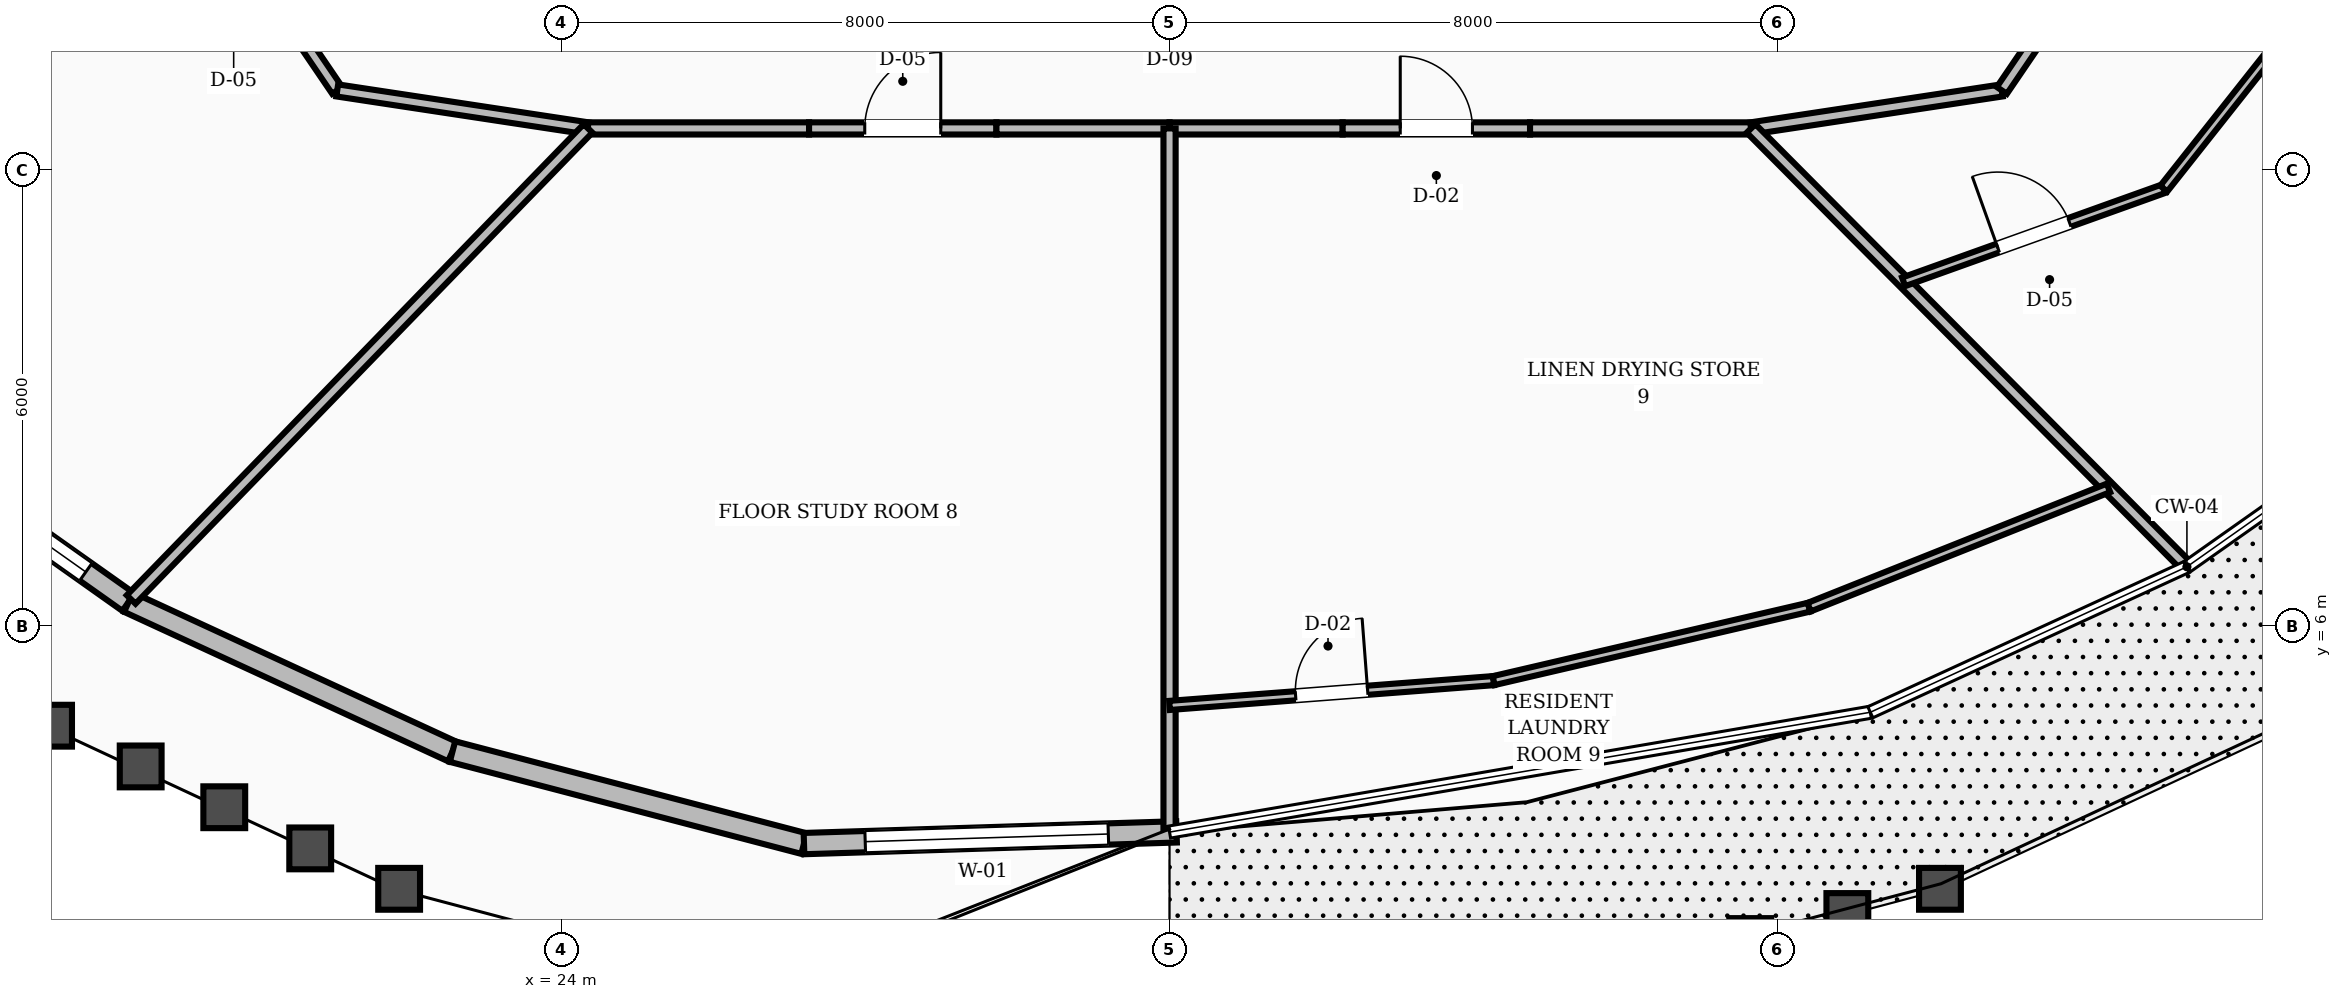
"""IFC4 building model, lengths in metres.
Left out: names, types, materials, properties, quantities, classifications, styles, units other than length and angle.
Written with IfcOpenShell. Run it as: python <this file> out.ifc"""

import sys

from ifc_helpers import new_model, si_unit, direction, frame, frame_2d, origin, place, context, subcontext, project, spatial, rectangle, extrude, element, fill, save


model = new_model("IFC4")
c1 = context("Model", 3, precision=1e-05, world=origin(), true_north=direction((0.0, 1.0)))
c2 = subcontext(c1, "Body", "Model", "MODEL_VIEW")
j1 = project(units=[si_unit("LENGTHUNIT", "METRE"), si_unit("PLANEANGLEUNIT", "RADIAN")], contexts=[c1])
p1 = place(None, origin())
s1 = spatial("IfcSite", under=j1, at=p1, CompositionType="ELEMENT")
p2 = place(p1, origin())
s2 = spatial("IfcBuilding", under=s1, at=p2, CompositionType="ELEMENT")
p3 = place(p2, frame((0.0, 0.0, 196.4)))
s3 = spatial("IfcBuildingStorey", under=s2, at=p3, CompositionType="ELEMENT", Elevation=196.4)
p4 = place(p3, frame((14.569, 8.962, 0.0), z_axis=(0.0, 0.0, 1.0), x_axis=(0.81615549773, -0.577832331672, 0.0)))
e1 = element("IfcWall", 1, at=p4, inside=s3, PredefinedType="STANDARD", context=c2, shape_type="SweptSolid", body=[
    extrude(rectangle(XDim=4.577, YDim=0.28, at=frame_2d((2.289, 0.0))), origin(), (0.0, 0.0, 1.0), 2.82),
])
p5 = place(p4, frame((0.688, 0.0, 0.8)))
e2 = element("IfcOpeningElement", 2, at=p5, cuts=e1, PredefinedType="OPENING", context=c2, shape_type="SweptSolid", body=[
    extrude(rectangle(XDim=3.2, YDim=1.65, at=frame_2d((1.6, 0.825))), frame((0.0, 0.15, 0.0), z_axis=(0.0, -1.0, 0.0), x_axis=(1.0, 0.0, 0.0)), (0.0, 0.0, 1.0), 0.3),
])
p6 = place(p3, frame((18.304, 6.317, 0.0), z_axis=(0.0, 0.0, 1.0), x_axis=(0.908099405027, -0.41875466635, 0.0)))
e3 = element("IfcWall", 3, at=p6, inside=s3, PredefinedType="STANDARD", context=c2, shape_type="SweptSolid", body=[
    extrude(rectangle(XDim=4.693, YDim=0.28, at=frame_2d((2.347, 0.0))), origin(), (0.0, 0.0, 1.0), 2.82),
])
p7 = place(p3, frame((22.566, 4.352, 0.0), z_axis=(0.0, 0.0, 1.0), x_axis=(0.967422274867, -0.253168209086, 0.0)))
e4 = element("IfcWall", 4, at=p7, inside=s3, PredefinedType="STANDARD", context=c2, shape_type="SweptSolid", body=[
    extrude(rectangle(XDim=4.78, YDim=0.28, at=frame_2d((2.39, 0.0))), origin(), (0.0, 0.0, 1.0), 2.82),
])
p8 = place(p3, frame((27.191, 3.141, 0.0), z_axis=(0.0, 0.0, 1.0), x_axis=(0.999504860995, 0.031464787415, 0.0)))
e5 = element("IfcWall", 5, at=p8, inside=s3, PredefinedType="STANDARD", context=c2, shape_type="SweptSolid", body=[
    extrude(rectangle(XDim=4.904, YDim=0.28, at=frame_2d((2.452, 0.0))), origin(), (0.0, 0.0, 1.0), 2.82),
])
p9 = place(p8, frame((0.806, 0.0, 0.8)))
e6 = element("IfcOpeningElement", 6, at=p9, cuts=e5, PredefinedType="OPENING", context=c2, shape_type="SweptSolid", body=[
    extrude(rectangle(XDim=3.2, YDim=1.65, at=frame_2d((1.6, 0.825))), frame((0.0, 0.15, 0.0), z_axis=(0.0, -1.0, 0.0), x_axis=(1.0, 0.0, 0.0)), (0.0, 0.0, 1.0), 0.3),
])
p10 = place(p3, frame((19.35, 15.548, 0.0), z_axis=(0.0, 0.0, 1.0), x_axis=(0.562674669208, -0.826678423955, 0.0)))
e7 = element("IfcWall", 7, at=p10, inside=s3, PredefinedType="SOLIDWALL", context=c2, shape_type="SweptSolid", body=[
    extrude(rectangle(XDim=3.021, YDim=0.16, at=frame_2d((1.511, 0.0))), origin(), (0.0, 0.0, 1.0), 2.8),
])
p11 = place(p10, frame((1.01, 0.0, 0.0)))
e8 = element("IfcOpeningElement", 8, at=p11, cuts=e7, PredefinedType="OPENING", context=c2, shape_type="SweptSolid", body=[
    extrude(rectangle(XDim=1.0, YDim=2.1, at=frame_2d((0.5, 1.05))), frame((0.0, 0.09, 0.0), z_axis=(0.0, -1.0, 0.0), x_axis=(1.0, 0.0, 0.0)), (0.0, 0.0, 1.0), 0.18),
])
p12 = place(p3, frame((21.05, 13.05, 0.0), z_axis=(0.0, 0.0, 1.0), x_axis=(0.988710906508, -0.149835721217, 0.0)))
e9 = element("IfcWall", 9, at=p12, inside=s3, PredefinedType="SOLIDWALL", context=c2, shape_type="SweptSolid", body=[
    extrude(rectangle(XDim=3.337, YDim=0.16, at=frame_2d((1.668, 0.0))), origin(), (0.0, 0.0, 1.0), 2.8),
])
p13 = place(p3, frame((24.349, 12.55, 0.0), z_axis=(0.0, 0.0, 1.0), x_axis=(1.0, 0.0, 0.0)))
e10 = element("IfcWall", 10, at=p13, inside=s3, PredefinedType="SOLIDWALL", context=c2, shape_type="SweptSolid", body=[
    extrude(rectangle(XDim=2.908, YDim=0.16, at=frame_2d((1.454, 0.0))), origin(), (0.0, 0.0, 1.0), 2.8),
])
p14 = place(p3, frame((27.257, 12.55, 0.0), z_axis=(0.0, 0.0, 1.0), x_axis=(1.0, 0.0, 0.0)))
e11 = element("IfcWall", 11, at=p14, inside=s3, PredefinedType="SOLIDWALL", context=c2, shape_type="SweptSolid", body=[
    extrude(rectangle(XDim=2.465, YDim=0.16, at=frame_2d((1.232, 0.0))), origin(), (0.0, 0.0, 1.0), 2.8),
])
p15 = place(p14, frame((0.733, 0.0, 0.0)))
e12 = element("IfcOpeningElement", 12, at=p15, cuts=e11, PredefinedType="OPENING", context=c2, shape_type="SweptSolid", body=[
    extrude(rectangle(XDim=1.0, YDim=2.1, at=frame_2d((0.5, 1.05))), frame((0.0, 0.09, 0.0), z_axis=(0.0, -1.0, 0.0), x_axis=(1.0, 0.0, 0.0)), (0.0, 0.0, 1.0), 0.18),
])
for number, where, z_axis, x_axis in (
    (13, (29.722, 12.55, 0.0), (0.0, 0.0, 1.0), (1.0, 0.0, 0.0)),
    (14, (32.0, 12.55, 0.0), (0.0, 0.0, 1.0), (1.0, 0.0, 0.0)),
):
    element("IfcWall", number, at=place(p3, frame(where, z_axis=z_axis, x_axis=x_axis)), inside=s3, PredefinedType="SOLIDWALL", context=c2, shape_type="SweptSolid", body=[
        extrude(rectangle(XDim=2.278, YDim=0.16, at=frame_2d((1.139, 0.0))), origin(), (0.0, 0.0, 1.0), 2.8),
    ])
p16 = place(p3, frame((34.278, 12.55, 0.0), z_axis=(0.0, 0.0, 1.0), x_axis=(1.0, 0.0, 0.0)))
e15 = element("IfcWall", 15, at=p16, inside=s3, PredefinedType="SOLIDWALL", context=c2, shape_type="SweptSolid", body=[
    extrude(rectangle(XDim=2.465, YDim=0.16, at=frame_2d((1.232, 0.0))), origin(), (0.0, 0.0, 1.0), 2.8),
])
p17 = place(p16, frame((0.758, 0.0, 0.0)))
e16 = element("IfcOpeningElement", 16, at=p17, cuts=e15, PredefinedType="OPENING", context=c2, shape_type="SweptSolid", body=[
    extrude(rectangle(XDim=0.95, YDim=2.1, at=frame_2d((0.475, 1.05))), frame((0.0, 0.09, 0.0), z_axis=(0.0, -1.0, 0.0), x_axis=(1.0, 0.0, 0.0)), (0.0, 0.0, 1.0), 0.18),
])
p18 = place(p3, frame((36.743, 12.55, 0.0), z_axis=(0.0, 0.0, 1.0), x_axis=(1.0, 0.0, 0.0)))
e17 = element("IfcWall", 17, at=p18, inside=s3, PredefinedType="SOLIDWALL", context=c2, shape_type="SweptSolid", body=[
    extrude(rectangle(XDim=2.908, YDim=0.16, at=frame_2d((1.454, 0.0))), origin(), (0.0, 0.0, 1.0), 2.8),
])
p19 = place(p3, frame((39.651, 12.55, 0.0), z_axis=(0.0, 0.0, 1.0), x_axis=(0.988710906508, 0.149835721217, 0.0)))
e18 = element("IfcWall", 18, at=p19, inside=s3, PredefinedType="SOLIDWALL", context=c2, shape_type="SweptSolid", body=[
    extrude(rectangle(XDim=3.337, YDim=0.16, at=frame_2d((1.668, 0.0))), origin(), (0.0, 0.0, 1.0), 2.8),
])
p20 = place(p3, frame((42.95, 13.05, 0.0), z_axis=(0.0, 0.0, 1.0), x_axis=(0.562674669208, 0.826678423955, 0.0)))
e19 = element("IfcWall", 19, at=p20, inside=s3, PredefinedType="SOLIDWALL", context=c2, shape_type="SweptSolid", body=[
    extrude(rectangle(XDim=3.021, YDim=0.16, at=frame_2d((1.511, 0.0))), origin(), (0.0, 0.0, 1.0), 2.8),
])
p21 = place(p3, frame((39.651, 12.55, 0.0), z_axis=(0.0, 0.0, 1.0), x_axis=(0.705049844298, -0.709157751882, 0.0)))
e20 = element("IfcWall", 20, at=p21, inside=s3, PredefinedType="SOLIDWALL", context=c2, shape_type="SweptSolid", body=[
    extrude(rectangle(XDim=8.083, YDim=0.16, at=frame_2d((4.042, 0.0))), origin(), (0.0, 0.0, 1.0), 2.8),
])
p22 = place(p3, frame((41.657, 10.531, 0.0), z_axis=(0.0, 0.0, 1.0), x_axis=(0.941388902833, 0.337323188681, 0.0)))
e21 = element("IfcWall", 21, at=p22, inside=s3, PredefinedType="PARTITIONING", context=c2, shape_type="SweptSolid", body=[
    extrude(rectangle(XDim=3.635, YDim=0.12, at=frame_2d((1.818, 0.0))), origin(), (0.0, 0.0, 1.0), 2.8),
])
p23 = place(p22, frame((1.318, 0.0, 0.0)))
e22 = element("IfcOpeningElement", 22, at=p23, cuts=e21, PredefinedType="OPENING", context=c2, shape_type="SweptSolid", body=[
    extrude(rectangle(XDim=1.0, YDim=2.1, at=frame_2d((0.5, 1.05))), frame((0.0, 0.07, 0.0), z_axis=(0.0, -1.0, 0.0), x_axis=(1.0, 0.0, 0.0)), (0.0, 0.0, 1.0), 0.14),
])
p24 = place(p3, frame((45.08, 11.758, 0.0), z_axis=(0.0, 0.0, 1.0), x_axis=(0.620585820478, 0.78413853331, 0.0)))
e23 = element("IfcWall", 23, at=p24, inside=s3, PredefinedType="PARTITIONING", context=c2, shape_type="SweptSolid", body=[
    extrude(rectangle(XDim=3.471, YDim=0.12, at=frame_2d((1.735, 0.0))), origin(), (0.0, 0.0, 1.0), 2.8),
])
p25 = place(p3, frame((24.349, 12.55, 0.0), z_axis=(0.0, 0.0, 1.0), x_axis=(-0.69620722349, -0.717840861167, 0.0)))
e24 = element("IfcWall", 24, at=p25, inside=s3, PredefinedType="SOLIDWALL", context=c2, shape_type="SweptSolid", body=[
    extrude(rectangle(XDim=8.633, YDim=0.16, at=frame_2d((4.317, 0.0))), origin(), (0.0, 0.0, 1.0), 2.8),
])
p26 = place(p3, frame((32.0, 12.55, 0.0), z_axis=(0.0, 0.0, 1.0), x_axis=(0.0, -1.0, 0.0)))
e25 = element("IfcWall", 25, at=p26, inside=s3, PredefinedType="SOLIDWALL", context=c2, shape_type="SweptSolid", body=[
    extrude(rectangle(XDim=9.207, YDim=0.16, at=frame_2d((4.604, 0.0))), origin(), (0.0, 0.0, 1.0), 2.8),
])
p27 = place(p3, frame((32.0, 4.959, 0.0), z_axis=(0.0, 0.0, 1.0), x_axis=(0.997082627401, 0.076329772278, 0.0)))
e26 = element("IfcWall", 26, at=p27, inside=s3, PredefinedType="PARTITIONING", context=c2, shape_type="SweptSolid", body=[
    extrude(rectangle(XDim=4.276, YDim=0.12, at=frame_2d((2.138, 0.0))), origin(), (0.0, 0.0, 1.0), 2.8),
])
p28 = place(p27, frame((1.663, 0.0, 0.0)))
e27 = element("IfcOpeningElement", 27, at=p28, cuts=e26, PredefinedType="OPENING", context=c2, shape_type="SweptSolid", body=[
    extrude(rectangle(XDim=0.95, YDim=2.1, at=frame_2d((0.475, 1.05))), frame((0.0, 0.07, 0.0), z_axis=(0.0, -1.0, 0.0), x_axis=(1.0, 0.0, 0.0)), (0.0, 0.0, 1.0), 0.14),
])
p29 = place(p3, frame((36.264, 5.285, 0.0), z_axis=(0.0, 0.0, 1.0), x_axis=(0.973957731006, 0.226729658877, 0.0)))
e28 = element("IfcWall", 28, at=p29, inside=s3, PredefinedType="PARTITIONING", context=c2, shape_type="SweptSolid", body=[
    extrude(rectangle(XDim=4.261, YDim=0.12, at=frame_2d((2.13, 0.0))), origin(), (0.0, 0.0, 1.0), 2.8),
])
p30 = place(p3, frame((40.414, 6.251, 0.0), z_axis=(0.0, 0.0, 1.0), x_axis=(0.928976219059, 0.370139412144, 0.0)))
e29 = element("IfcWall", 29, at=p30, inside=s3, PredefinedType="PARTITIONING", context=c2, shape_type="SweptSolid", body=[
    extrude(rectangle(XDim=4.24, YDim=0.12, at=frame_2d((2.12, 0.0))), origin(), (0.0, 0.0, 1.0), 2.8),
])
p31 = place(p5, origin())
e30 = element("IfcWindow", 30, at=p31, inside=s3, PartitioningType="SINGLE_PANEL", PredefinedType="WINDOW", context=c2, shape_type="SweptSolid", body=[
    extrude(rectangle(XDim=3.2, YDim=1.65, at=frame_2d((1.6, 0.825))), frame((0.0, 0.03, 0.0), z_axis=(0.0, -1.0, 0.0), x_axis=(1.0, 0.0, 0.0)), (0.0, 0.0, 1.0), 0.06),
])
fill(e2, e30)
p32 = place(p9, origin())
e31 = element("IfcWindow", 31, at=p32, inside=s3, PartitioningType="SINGLE_PANEL", PredefinedType="WINDOW", context=c2, shape_type="SweptSolid", body=[
    extrude(rectangle(XDim=3.2, YDim=1.65, at=frame_2d((1.6, 0.825))), frame((0.0, 0.03, 0.0), z_axis=(0.0, -1.0, 0.0), x_axis=(1.0, 0.0, 0.0)), (0.0, 0.0, 1.0), 0.06),
])
fill(e6, e31)
p33 = place(p23, origin())
e32 = element("IfcDoor", 32, at=p33, inside=s3, OperationType="SINGLE_SWING_LEFT", PredefinedType="DOOR", context=c2, shape_type="SweptSolid", body=[
    extrude(rectangle(XDim=1.0, YDim=2.1, at=frame_2d((0.5, 1.05))), frame((0.0, 0.025, 0.0), z_axis=(0.0, -1.0, 0.0), x_axis=(1.0, 0.0, 0.0)), (0.0, 0.0, 1.0), 0.05),
])
fill(e22, e32)
p34 = place(p15, origin())
e33 = element("IfcDoor", 33, at=p34, inside=s3, OperationType="SINGLE_SWING_RIGHT", PredefinedType="DOOR", context=c2, shape_type="SweptSolid", body=[
    extrude(rectangle(XDim=1.0, YDim=2.1, at=frame_2d((0.5, 1.05))), frame((0.0, 0.025, 0.0), z_axis=(0.0, -1.0, 0.0), x_axis=(1.0, 0.0, 0.0)), (0.0, 0.0, 1.0), 0.05),
])
fill(e12, e33)
p35 = place(p17, origin())
e34 = element("IfcDoor", 34, at=p35, inside=s3, OperationType="SINGLE_SWING_LEFT", PredefinedType="DOOR", context=c2, shape_type="SweptSolid", body=[
    extrude(rectangle(XDim=0.95, YDim=2.1, at=frame_2d((0.475, 1.05))), frame((0.0, 0.025, 0.0), z_axis=(0.0, -1.0, 0.0), x_axis=(1.0, 0.0, 0.0)), (0.0, 0.0, 1.0), 0.05),
])
fill(e16, e34)
p36 = place(p28, origin())
e35 = element("IfcDoor", 35, at=p36, inside=s3, OperationType="SINGLE_SWING_RIGHT", PredefinedType="DOOR", context=c2, shape_type="SweptSolid", body=[
    extrude(rectangle(XDim=0.95, YDim=2.1, at=frame_2d((0.475, 1.05))), frame((0.0, 0.025, 0.0), z_axis=(0.0, -1.0, 0.0), x_axis=(1.0, 0.0, 0.0)), (0.0, 0.0, 1.0), 0.05),
])
fill(e27, e35)
save(model, sys.argv[1])
